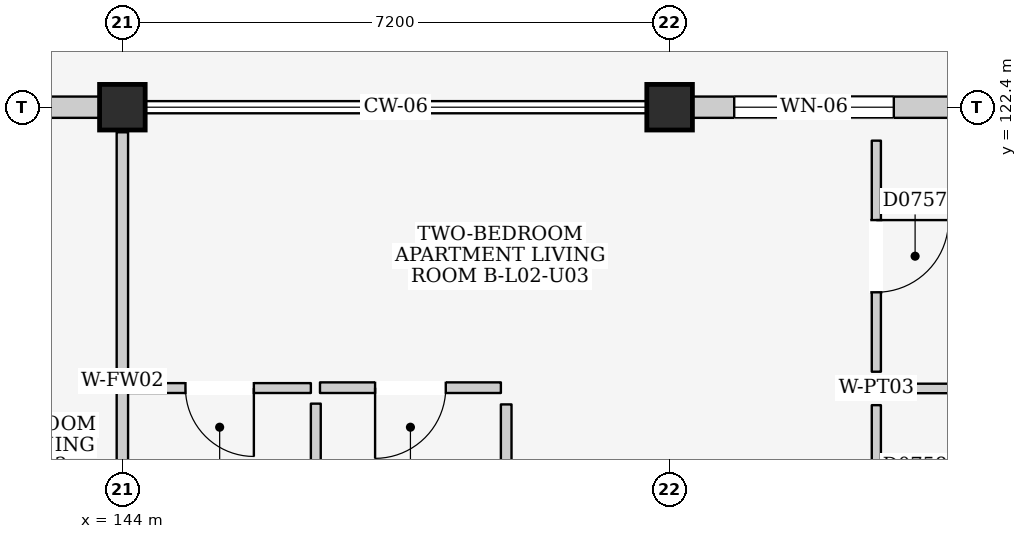
"""IFC4 building model, lengths in metres.
Left out: names, types, materials, properties, quantities, classifications, styles, units other than length and angle.
Written with IfcOpenShell. Run it as: python <this file> out.ifc"""

import sys

from ifc_helpers import new_model, si_unit, direction, frame, frame_2d, origin, origin_2d, place, context, subcontext, project, spatial, rectangle, extrude, element, fill, save


model = new_model("IFC4")
c1 = context("Model", 3, precision=1e-05, world=origin(), true_north=direction((0.0, 1.0)))
c2 = subcontext(c1, "Body", "Model", "MODEL_VIEW")
j1 = project(units=[si_unit("LENGTHUNIT", "METRE"), si_unit("PLANEANGLEUNIT", "RADIAN")], contexts=[c1])
p1 = place(None, origin())
s1 = spatial("IfcSite", under=j1, at=p1, CompositionType="ELEMENT")
p2 = place(p1, origin())
s2 = spatial("IfcBuilding", under=s1, at=p2, CompositionType="ELEMENT")
p3 = place(p2, frame((0.0, 0.0, 9.0)))
s3 = spatial("IfcBuildingStorey", under=s2, at=p3, CompositionType="ELEMENT", Elevation=9.0)
for number, where, z_axis, x_axis in (
    (1, (144.0, 122.4, 0.0), (0.0, 0.0, 1.0), (1.0, 0.0, 0.0)),
    (2, (151.2, 122.4, 0.0), (0.0, 0.0, 1.0), (1.0, 0.0, 0.0)),
):
    element("IfcColumn", number, at=place(p3, frame(where, z_axis=z_axis, x_axis=x_axis)), inside=s3, PredefinedType="COLUMN", context=c2, shape_type="SweptSolid", body=[
        extrude(rectangle(XDim=0.6, YDim=0.6, at=origin_2d()), origin(), (0.0, 0.0, 1.0), 3.2),
    ])
p4 = place(p3, frame((137.1, 122.4, 0.0), z_axis=(0.0, 0.0, 1.0), x_axis=(1.0, 0.0, 0.0)))
e3 = element("IfcWall", 3, at=p4, inside=s3, PredefinedType="ELEMENTEDWALL", context=c2, shape_type="SweptSolid", body=[
    extrude(rectangle(XDim=6.6, YDim=0.28, at=frame_2d((3.3, 0.0))), origin(), (0.0, 0.0, 1.0), 2.425),
])
p5 = place(p4, frame((3.85, 0.0, 0.0)))
e4 = element("IfcOpeningElement", 4, at=p5, cuts=e3, PredefinedType="OPENING", context=c2, shape_type="SweptSolid", body=[
    extrude(rectangle(XDim=2.0, YDim=2.12, at=frame_2d((1.0, 1.06))), frame((0.0, 0.155, 0.0), z_axis=(0.0, -1.0, 0.0), x_axis=(1.0, 0.0, 0.0)), (0.0, 0.0, 1.0), 0.31),
])
p6 = place(p4, frame((0.55, 0.0, 0.9)))
e5 = element("IfcOpeningElement", 5, at=p6, cuts=e3, PredefinedType="OPENING", context=c2, shape_type="SweptSolid", body=[
    extrude(rectangle(XDim=0.9, YDim=1.1, at=frame_2d((0.45, 0.55))), frame((0.0, 0.155, 0.0), z_axis=(0.0, -1.0, 0.0), x_axis=(1.0, 0.0, 0.0)), (0.0, 0.0, 1.0), 0.31),
])
p7 = place(p3, frame((151.5, 122.4, 0.0), z_axis=(0.0, 0.0, 1.0), x_axis=(1.0, 0.0, 0.0)))
e6 = element("IfcWall", 6, at=p7, inside=s3, PredefinedType="ELEMENTEDWALL", context=c2, shape_type="SweptSolid", body=[
    extrude(rectangle(XDim=6.6, YDim=0.28, at=frame_2d((3.3, 0.0))), origin(), (0.0, 0.0, 1.0), 2.425),
])
p8 = place(p7, frame((3.85, 0.0, 0.0)))
e7 = element("IfcOpeningElement", 7, at=p8, cuts=e6, PredefinedType="OPENING", context=c2, shape_type="SweptSolid", body=[
    extrude(rectangle(XDim=1.8, YDim=2.12, at=frame_2d((0.9, 1.06))), frame((0.0, 0.155, 0.0), z_axis=(0.0, -1.0, 0.0), x_axis=(1.0, 0.0, 0.0)), (0.0, 0.0, 1.0), 0.31),
])
p9 = place(p7, frame((0.55, 0.0, 0.665)))
e8 = element("IfcOpeningElement", 8, at=p9, cuts=e6, PredefinedType="OPENING", context=c2, shape_type="SweptSolid", body=[
    extrude(rectangle(XDim=2.1, YDim=1.65, at=frame_2d((1.05, 0.825))), frame((0.0, 0.155, 0.0), z_axis=(0.0, -1.0, 0.0), x_axis=(1.0, 0.0, 0.0)), (0.0, 0.0, 1.0), 0.31),
])
p10 = place(p3, frame((144.0, 115.53, 0.0), z_axis=(0.0, 0.0, 1.0), x_axis=(0.0, 1.0, 0.0)))
e9 = element("IfcWall", 9, at=p10, inside=s3, PredefinedType="PARTITIONING", context=c2, shape_type="SweptSolid", body=[
    extrude(rectangle(XDim=6.54, YDim=0.15, at=frame_2d((3.27, 0.0))), origin(), (0.0, 0.0, 1.0), 2.395),
])
p11 = place(p3, frame((144.08, 118.705, 0.0), z_axis=(0.0, 0.0, 1.0), x_axis=(1.0, 0.0, 0.0)))
e10 = element("IfcWall", 10, at=p11, inside=s3, PredefinedType="PARTITIONING", context=c2, shape_type="SweptSolid", body=[
    extrude(rectangle(XDim=2.4, YDim=0.13, at=frame_2d((1.2, 0.0))), origin(), (0.0, 0.0, 1.0), 2.96),
])
p12 = place(p11, frame((0.75, 0.0, 0.0)))
e11 = element("IfcOpeningElement", 11, at=p12, cuts=e10, PredefinedType="OPENING", context=c2, shape_type="SweptSolid", body=[
    extrude(rectangle(XDim=0.9, YDim=2.1, at=frame_2d((0.45, 1.05))), frame((0.0, 0.08, 0.0), z_axis=(0.0, -1.0, 0.0), x_axis=(1.0, 0.0, 0.0)), (0.0, 0.0, 1.0), 0.16),
])
p13 = place(p3, frame((146.545, 115.46, 0.0), z_axis=(0.0, 0.0, 1.0), x_axis=(0.0, 1.0, 0.0)))
e12 = element("IfcWall", 12, at=p13, inside=s3, PredefinedType="PARTITIONING", context=c2, shape_type="SweptSolid", body=[
    extrude(rectangle(XDim=3.04, YDim=0.13, at=frame_2d((1.52, 0.0))), origin(), (0.0, 0.0, 1.0), 2.96),
])
p14 = place(p3, frame((146.6, 118.71, 0.0), z_axis=(0.0, 0.0, 1.0), x_axis=(1.0, 0.0, 0.0)))
e13 = element("IfcWall", 13, at=p14, inside=s3, PredefinedType="PARTITIONING", context=c2, shape_type="SweptSolid", body=[
    extrude(rectangle(XDim=2.38, YDim=0.14, at=frame_2d((1.19, 0.0))), origin(), (0.0, 0.0, 1.0), 2.96),
])
p15 = place(p14, frame((0.725, 0.0, 0.0)))
e14 = element("IfcOpeningElement", 14, at=p15, cuts=e13, PredefinedType="OPENING", context=c2, shape_type="SweptSolid", body=[
    extrude(rectangle(XDim=0.93, YDim=2.14, at=frame_2d((0.465, 1.07))), frame((0.0, 0.085, 0.0), z_axis=(0.0, -1.0, 0.0), x_axis=(1.0, 0.0, 0.0)), (0.0, 0.0, 1.0), 0.17),
])
p16 = place(p3, frame((149.05, 115.43, 0.0), z_axis=(0.0, 0.0, 1.0), x_axis=(0.0, 1.0, 0.0)))
e15 = element("IfcWall", 15, at=p16, inside=s3, PredefinedType="PARTITIONING", context=c2, shape_type="SweptSolid", body=[
    extrude(rectangle(XDim=3.06, YDim=0.14, at=frame_2d((1.53, 0.0))), origin(), (0.0, 0.0, 1.0), 2.96),
])
p17 = place(p3, frame((153.92, 118.92, 0.0), z_axis=(0.0, 0.0, 1.0), x_axis=(0.0, 1.0, 0.0)))
e16 = element("IfcWall", 16, at=p17, inside=s3, PredefinedType="PARTITIONING", context=c2, shape_type="SweptSolid", body=[
    extrude(rectangle(XDim=3.04, YDim=0.12, at=frame_2d((1.52, 0.0))), origin(), (0.0, 0.0, 1.0), 2.96),
])
p18 = place(p17, frame((1.045, 0.0, 0.0)))
e17 = element("IfcOpeningElement", 17, at=p18, cuts=e16, PredefinedType="OPENING", context=c2, shape_type="SweptSolid", body=[
    extrude(rectangle(XDim=0.95, YDim=2.15, at=frame_2d((0.475, 1.075))), frame((0.0, 0.075, 0.0), z_axis=(0.0, -1.0, 0.0), x_axis=(1.0, 0.0, 0.0)), (0.0, 0.0, 1.0), 0.15),
])
p19 = place(p3, frame((154.12, 118.7, 0.0), z_axis=(0.0, 0.0, 1.0), x_axis=(1.0, 0.0, 0.0)))
e18 = element("IfcWall", 18, at=p19, inside=s3, PredefinedType="PARTITIONING", context=c2, shape_type="SweptSolid", body=[
    extrude(rectangle(XDim=4.06, YDim=0.125, at=frame_2d((2.03, 0.0))), origin(), (0.0, 0.0, 1.0), 2.96),
])
p20 = place(p3, frame((153.92, 115.44, 0.0), z_axis=(0.0, 0.0, 1.0), x_axis=(0.0, 1.0, 0.0)))
e19 = element("IfcWall", 19, at=p20, inside=s3, PredefinedType="PARTITIONING", context=c2, shape_type="SweptSolid", body=[
    extrude(rectangle(XDim=3.04, YDim=0.12, at=frame_2d((1.52, 0.0))), origin(), (0.0, 0.0, 1.0), 2.96),
])
p21 = place(p20, frame((1.04, 0.0, 0.0)))
e20 = element("IfcOpeningElement", 20, at=p21, cuts=e19, PredefinedType="OPENING", context=c2, shape_type="SweptSolid", body=[
    extrude(rectangle(XDim=0.96, YDim=2.15, at=frame_2d((0.48, 1.075))), frame((0.0, 0.075, 0.0), z_axis=(0.0, -1.0, 0.0), x_axis=(1.0, 0.0, 0.0)), (0.0, 0.0, 1.0), 0.15),
])
p22 = place(p9, origin())
e21 = element("IfcWindow", 21, at=p22, inside=s3, PartitioningType="DOUBLE_PANEL_VERTICAL", PredefinedType="WINDOW", context=c2, shape_type="SweptSolid", body=[
    extrude(rectangle(XDim=2.1, YDim=1.65, at=frame_2d((1.05, 0.825))), frame((0.0, 0.03, 0.0), z_axis=(0.0, -1.0, 0.0), x_axis=(1.0, 0.0, 0.0)), (0.0, 0.0, 1.0), 0.06),
])
fill(e8, e21)
p23 = place(p12, frame((0.9, 0.0, 0.0), z_axis=(0.0, 0.0, 1.0), x_axis=(-1.0, 0.0, 0.0)))
e22 = element("IfcDoor", 22, at=p23, inside=s3, OperationType="SINGLE_SWING_LEFT", PredefinedType="DOOR", context=c2, shape_type="SweptSolid", body=[
    extrude(rectangle(XDim=0.9, YDim=2.1, at=frame_2d((0.45, 1.05))), frame((0.0, 0.025, 0.0), z_axis=(0.0, -1.0, 0.0), x_axis=(1.0, 0.0, 0.0)), (0.0, 0.0, 1.0), 0.05),
])
fill(e11, e22)
p24 = place(p15, frame((0.93, 0.0, 0.0), z_axis=(0.0, 0.0, 1.0), x_axis=(-1.0, 0.0, 0.0)))
e23 = element("IfcDoor", 23, at=p24, inside=s3, OperationType="SINGLE_SWING_RIGHT", PredefinedType="DOOR", context=c2, shape_type="SweptSolid", body=[
    extrude(rectangle(XDim=0.93, YDim=2.14, at=frame_2d((0.465, 1.07))), frame((0.0, 0.025, 0.0), z_axis=(0.0, -1.0, 0.0), x_axis=(1.0, 0.0, 0.0)), (0.0, 0.0, 1.0), 0.05),
])
fill(e14, e23)
p25 = place(p18, frame((0.95, 0.0, 0.0), z_axis=(0.0, 0.0, 1.0), x_axis=(-1.0, 0.0, 0.0)))
e24 = element("IfcDoor", 24, at=p25, inside=s3, OperationType="SINGLE_SWING_LEFT", PredefinedType="DOOR", context=c2, shape_type="SweptSolid", body=[
    extrude(rectangle(XDim=0.95, YDim=2.15, at=frame_2d((0.475, 1.075))), frame((0.0, 0.025, 0.0), z_axis=(0.0, -1.0, 0.0), x_axis=(1.0, 0.0, 0.0)), (0.0, 0.0, 1.0), 0.05),
])
fill(e17, e24)
save(model, sys.argv[1])
